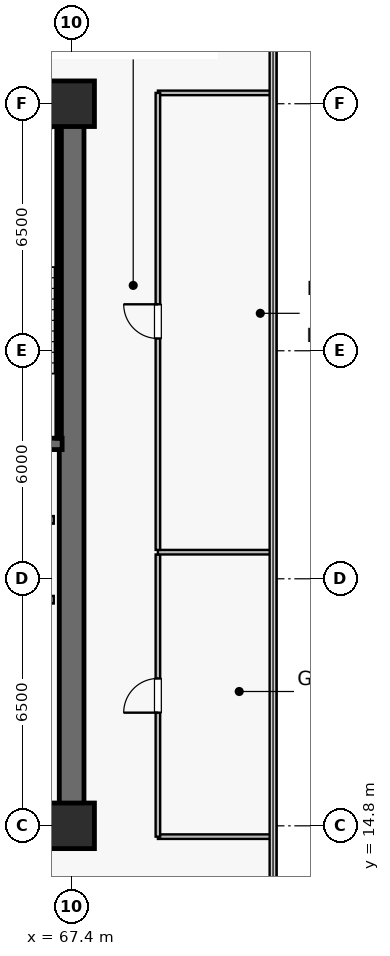
"""IFC4 building model, lengths in metres.
Left out: names, types, materials, properties, quantities, classifications, styles, units other than length and angle.
Written with IfcOpenShell. Run it as: python <this file> out.ifc"""

import sys

from ifc_helpers import new_model, si_unit, direction, frame, frame_2d, origin, origin_2d, place, context, subcontext, project, spatial, rectangle, extrude, source, transform, mapped, element, fill, save


model = new_model("IFC4")
c1 = context("Model", 3, precision=1e-05, world=origin(), true_north=direction((0.0, 1.0)))
c2 = subcontext(c1, "Body", "Model", "MODEL_VIEW")
j1 = project(units=[si_unit("LENGTHUNIT", "METRE"), si_unit("PLANEANGLEUNIT", "RADIAN")], contexts=[c1])
p1 = place(None, origin())
s1 = spatial("IfcSite", under=j1, at=p1, CompositionType="ELEMENT")
p2 = place(p1, origin())
s2 = spatial("IfcBuilding", under=s1, at=p2, CompositionType="ELEMENT")
p3 = place(p2, frame((0.0, 0.0, 174.8)))
s3 = spatial("IfcBuildingStorey", under=s2, at=p3, CompositionType="ELEMENT", Elevation=174.8)
p4 = place(p3, frame((52.275, 14.8, 0.0), z_axis=(0.0, 0.0, 1.0), x_axis=(1.0, 0.0, 0.0)))
e1 = element("IfcWall", 1, at=p4, inside=s3, PredefinedType="SHEAR", context=c2, shape_type="SweptSolid", body=[
    extrude(rectangle(XDim=15.45, YDim=0.65, at=frame_2d((7.725, 0.0))), origin(), (0.0, 0.0, 1.0), 3.79),
])
p5 = place(p3, frame((52.275, 33.8, 0.0), z_axis=(0.0, 0.0, 1.0), x_axis=(1.0, 0.0, 0.0)))
e2 = element("IfcWall", 2, at=p5, inside=s3, PredefinedType="SHEAR", context=c2, shape_type="SweptSolid", body=[
    extrude(rectangle(XDim=15.45, YDim=0.65, at=frame_2d((7.725, 0.0))), origin(), (0.0, 0.0, 1.0), 3.79),
])
p6 = place(p5, frame((6.125, 0.0, 0.0)))
e3 = element("IfcOpeningElement", 3, at=p6, cuts=e2, PredefinedType="OPENING", context=c2, shape_type="SweptSolid", body=[
    extrude(rectangle(XDim=0.95, YDim=2.15, at=frame_2d((0.475, 1.075))), frame((0.0, 0.335, 0.0), z_axis=(0.0, -1.0, 0.0), x_axis=(1.0, 0.0, 0.0)), (0.0, 0.0, 1.0), 0.67),
])
p7 = place(p5, frame((2.585, 0.0, 0.0)))
e4 = element("IfcOpeningElement", 4, at=p7, cuts=e2, PredefinedType="OPENING", context=c2, shape_type="SweptSolid", body=[
    extrude(rectangle(XDim=0.95, YDim=2.15, at=frame_2d((0.475, 1.075))), frame((0.0, 0.335, 0.0), z_axis=(0.0, -1.0, 0.0), x_axis=(1.0, 0.0, 0.0)), (0.0, 0.0, 1.0), 0.67),
])
p8 = place(p3, frame((67.4, 15.125, 0.0), z_axis=(0.0, 0.0, 1.0), x_axis=(0.0, 1.0, 0.0)))
e5 = element("IfcWall", 5, at=p8, inside=s3, PredefinedType="SHEAR", context=c2, shape_type="SweptSolid", body=[
    extrude(rectangle(XDim=18.35, YDim=0.65, at=frame_2d((9.175, 0.0))), origin(), (0.0, 0.0, 1.0), 3.79),
])
p9 = place(p3, frame((63.35, 24.85, 0.0), z_axis=(0.0, 0.0, 1.0), x_axis=(1.0, 0.0, 0.0)))
e6 = element("IfcWall", 6, at=p9, inside=s3, PredefinedType="SHEAR", context=c2, shape_type="SweptSolid", body=[
    extrude(rectangle(XDim=3.8, YDim=0.3, at=frame_2d((1.9, 0.0))), origin(), (0.0, 0.0, 1.0), 3.79),
])
p10 = place(p3, frame((63.35, 33.4, 0.0), z_axis=(0.0, 0.0, 1.0), x_axis=(1.0, 0.0, 0.0)))
e7 = element("IfcWall", 7, at=p10, inside=s3, PredefinedType="SOLIDWALL", context=c2, shape_type="SweptSolid", body=[
    extrude(rectangle(XDim=3.72, YDim=0.12, at=frame_2d((1.86, 0.0))), origin(), (0.0, 0.0, 1.0), 3.79),
])
p11 = place(p3, frame((67.07, 25.0, 0.0), z_axis=(0.0, 0.0, 1.0), x_axis=(0.0, 1.0, 0.0)))
e8 = element("IfcWall", 8, at=p11, inside=s3, PredefinedType="SOLIDWALL", context=c2, shape_type="SweptSolid", body=[
    extrude(rectangle(XDim=8.32, YDim=0.12, at=frame_2d((4.16, 0.0))), origin(), (0.0, 0.0, 1.0), 3.79),
])
m1 = source(origin(), c2, "Body", "SweptSolid", [
    extrude(rectangle(XDim=1.2, YDim=1.2, at=origin_2d()), origin(), (0.0, 0.0, 1.0), 4.1),
])
for number, where, z_axis, x_axis in (
    (9, (67.4, 14.8, 0.0), (0.0, 0.0, 1.0), (1.0, 0.0, 0.0)),
    (10, (67.4, 33.8, 0.0), (0.0, 0.0, 1.0), (1.0, 0.0, 0.0)),
):
    element("IfcColumn", number, at=place(p3, frame(where, z_axis=z_axis, x_axis=x_axis)), inside=s3, PredefinedType="COLUMN", context=c2, shape_type="MappedRepresentation", body=[
        mapped(m1, transform((0.0, 0.0, 0.0), scale=1.0)),
    ])
for number, where, z_axis, x_axis in (
    (11, (64.67, 20.75, 0.0), (0.0, 0.0, 1.0), (1.0, 0.0, 0.0)),
    (12, (64.67, 22.85, 0.0), (0.0, 0.0, 1.0), (1.0, 0.0, 0.0)),
):
    element("IfcWall", number, at=place(p3, frame(where, z_axis=z_axis, x_axis=x_axis)), inside=s3, PredefinedType="SOLIDWALL", context=c2, shape_type="SweptSolid", body=[
        extrude(rectangle(XDim=2.26, YDim=0.2, at=frame_2d((1.13, 0.0))), origin(), (0.0, 0.0, 1.0), 3.79),
    ])
for number, where, z_axis, x_axis in (
    (13, (69.67, 14.515, 0.0), (0.0, 0.0, 1.0), (1.0, 0.0, 0.0)),
    (14, (69.67, 34.085, 0.0), (0.0, 0.0, 1.0), (1.0, 0.0, 0.0)),
):
    element("IfcWall", number, at=place(p3, frame(where, z_axis=z_axis, x_axis=x_axis)), inside=s3, PredefinedType="PARTITIONING", context=c2, shape_type="SweptSolid", body=[
        extrude(rectangle(XDim=3.02, YDim=0.12, at=frame_2d((1.51, 0.0))), origin(), (0.0, 0.0, 1.0), 3.79),
    ])
p12 = place(p3, frame((69.67, 14.515, 0.0), z_axis=(0.0, 0.0, 1.0), x_axis=(0.0, 1.0, 0.0)))
e15 = element("IfcWall", 15, at=p12, inside=s3, PredefinedType="PARTITIONING", context=c2, shape_type="SweptSolid", body=[
    extrude(rectangle(XDim=7.425, YDim=0.12, at=frame_2d((3.712, 0.0))), origin(), (0.0, 0.0, 1.0), 3.79),
])
p13 = place(p12, frame((3.262, 0.0, 0.0)))
e16 = element("IfcOpeningElement", 16, at=p13, cuts=e15, PredefinedType="OPENING", context=c2, shape_type="SweptSolid", body=[
    extrude(rectangle(XDim=0.9, YDim=2.1, at=frame_2d((0.45, 1.05))), frame((0.0, 0.07, 0.0), z_axis=(0.0, -1.0, 0.0), x_axis=(1.0, 0.0, 0.0)), (0.0, 0.0, 1.0), 0.14),
])
p14 = place(p3, frame((69.67, 22.0, 0.0), z_axis=(0.0, 0.0, 1.0), x_axis=(1.0, 0.0, 0.0)))
e17 = element("IfcWall", 17, at=p14, inside=s3, PredefinedType="PARTITIONING", context=c2, shape_type="SweptSolid", body=[
    extrude(rectangle(XDim=3.02, YDim=0.12, at=frame_2d((1.51, 0.0))), origin(), (0.0, 0.0, 1.0), 3.79),
])
p15 = place(p3, frame((69.67, 22.06, 0.0), z_axis=(0.0, 0.0, 1.0), x_axis=(0.0, 1.0, 0.0)))
e18 = element("IfcWall", 18, at=p15, inside=s3, PredefinedType="PARTITIONING", context=c2, shape_type="SweptSolid", body=[
    extrude(rectangle(XDim=12.025, YDim=0.12, at=frame_2d((6.012, 0.0))), origin(), (0.0, 0.0, 1.0), 3.79),
])
p16 = place(p15, frame((5.562, 0.0, 0.0)))
e19 = element("IfcOpeningElement", 19, at=p16, cuts=e18, PredefinedType="OPENING", context=c2, shape_type="SweptSolid", body=[
    extrude(rectangle(XDim=0.9, YDim=2.1, at=frame_2d((0.45, 1.05))), frame((0.0, 0.07, 0.0), z_axis=(0.0, -1.0, 0.0), x_axis=(1.0, 0.0, 0.0)), (0.0, 0.0, 1.0), 0.14),
])
m2 = source(origin(), c2, "Body", "SweptSolid", [
    extrude(rectangle(XDim=0.9, YDim=2.1, at=frame_2d((0.45, 1.05))), frame((0.0, 0.025, 0.0), z_axis=(0.0, -1.0, 0.0), x_axis=(1.0, 0.0, 0.0)), (0.0, 0.0, 1.0), 0.05),
])
p17 = place(p13, origin())
e20 = element("IfcDoor", 20, at=p17, inside=s3, OperationType="SINGLE_SWING_LEFT", PredefinedType="DOOR", context=c2, shape_type="MappedRepresentation", body=[
    mapped(m2, transform((0.0, 0.0, 0.0), scale=1.0)),
])
fill(e16, e20)
p18 = place(p16, origin())
e21 = element("IfcDoor", 21, at=p18, inside=s3, OperationType="SINGLE_SWING_RIGHT", PredefinedType="DOOR", context=c2, shape_type="MappedRepresentation", body=[
    mapped(m2, transform((0.0, 0.0, 0.0), scale=1.0)),
])
fill(e19, e21)
save(model, sys.argv[1])
